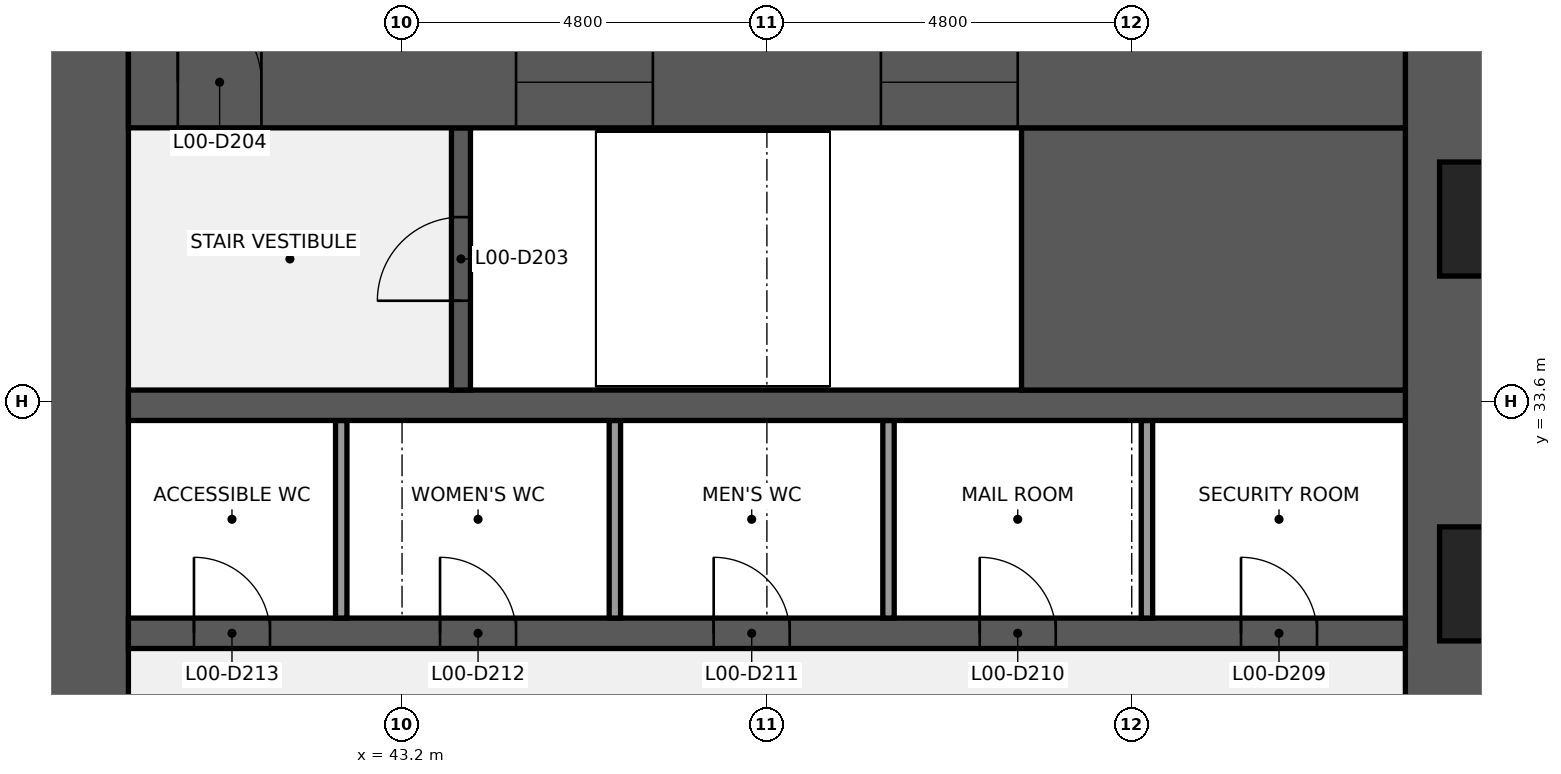
"""IFC4 building model, lengths in metres.
Left out: names, types, materials, properties, quantities, classifications, styles, units other than length and angle.
Written with IfcOpenShell. Run it as: python <this file> out.ifc"""

import sys

from ifc_helpers import new_model, si_unit, direction, frame, frame_2d, origin, place, context, subcontext, project, spatial, rectangle, extrude, element, fill, save


model = new_model("IFC4")
c1 = context("Model", 3, precision=1e-05, world=origin(), true_north=direction((0.0, 1.0)))
c2 = subcontext(c1, "Body", "Model", "MODEL_VIEW")
j1 = project(units=[si_unit("LENGTHUNIT", "METRE"), si_unit("PLANEANGLEUNIT", "RADIAN")], contexts=[c1])
p1 = place(None, origin())
s1 = spatial("IfcSite", under=j1, at=p1, CompositionType="ELEMENT")
p2 = place(p1, origin())
s2 = spatial("IfcBuilding", under=s1, at=p2, CompositionType="ELEMENT")
p3 = place(p2, origin())
s3 = spatial("IfcBuildingStorey", under=s2, at=p3, CompositionType="ELEMENT", Elevation=0.0)
p4 = place(p3, frame((57.0, 38.4, -2.0), z_axis=(0.0, 0.0, 1.0), x_axis=(0.0, -1.0, 0.0)))
e1 = element("IfcWall", 1, at=p4, inside=s3, PredefinedType="SHEAR", context=c2, shape_type="SweptSolid", body=[
    extrude(rectangle(XDim=28.8, YDim=1.2, at=frame_2d((14.4, 0.0))), origin(), (0.0, 0.0, 1.0), 14.3),
])
p5 = place(p4, frame((18.45, 0.0, 2.9)))
e2 = element("IfcOpeningElement", 2, at=p5, cuts=e1, PredefinedType="OPENING", context=c2, shape_type="SweptSolid", body=[
    extrude(rectangle(XDim=1.5, YDim=1.5, at=frame_2d((0.75, 0.75))), frame((0.0, 0.61, 0.0), z_axis=(0.0, -1.0, 0.0), x_axis=(1.0, 0.0, 0.0)), (0.0, 0.0, 1.0), 1.22),
])
p6 = place(p4, frame((8.85, 0.0, 2.9)))
e3 = element("IfcOpeningElement", 3, at=p6, cuts=e1, PredefinedType="OPENING", context=c2, shape_type="SweptSolid", body=[
    extrude(rectangle(XDim=1.5, YDim=1.5, at=frame_2d((0.75, 0.75))), frame((0.0, 0.61, 0.0), z_axis=(0.0, -1.0, 0.0), x_axis=(1.0, 0.0, 0.0)), (0.0, 0.0, 1.0), 1.22),
])
p7 = place(p3, frame((39.0, 9.6, -2.0), z_axis=(0.0, 0.0, 1.0), x_axis=(0.0, 1.0, 0.0)))
e4 = element("IfcWall", 4, at=p7, inside=s3, PredefinedType="SHEAR", context=c2, shape_type="SweptSolid", body=[
    extrude(rectangle(XDim=28.8, YDim=1.2, at=frame_2d((14.4, 0.0))), origin(), (0.0, 0.0, 1.0), 14.3),
])
p8 = place(p7, frame((8.7, 0.0, 2.0)))
e5 = element("IfcOpeningElement", 5, at=p8, cuts=e4, PredefinedType="OPENING", context=c2, shape_type="SweptSolid", body=[
    extrude(rectangle(XDim=1.8, YDim=2.1, at=frame_2d((0.9, 1.05))), frame((0.0, 0.61, 0.0), z_axis=(0.0, -1.0, 0.0), x_axis=(1.0, 0.0, 0.0)), (0.0, 0.0, 1.0), 1.22),
])
p9 = place(p7, frame((18.3, 0.0, 2.0)))
e6 = element("IfcOpeningElement", 6, at=p9, cuts=e4, PredefinedType="OPENING", context=c2, shape_type="SweptSolid", body=[
    extrude(rectangle(XDim=1.8, YDim=2.1, at=frame_2d((0.9, 1.05))), frame((0.0, 0.61, 0.0), z_axis=(0.0, -1.0, 0.0), x_axis=(1.0, 0.0, 0.0)), (0.0, 0.0, 1.0), 1.22),
])
p10 = place(p3, frame((39.6, 30.55, -2.0), z_axis=(0.0, 0.0, 1.0), x_axis=(1.0, 0.0, 0.0)))
e7 = element("IfcWall", 7, at=p10, inside=s3, PredefinedType="SHEAR", context=c2, shape_type="SweptSolid", body=[
    extrude(rectangle(XDim=16.8, YDim=0.4, at=frame_2d((8.4, 0.0))), origin(), (0.0, 0.0, 1.0), 14.3),
])
p11 = place(p10, frame((14.637, 0.0, 2.0)))
e8 = element("IfcOpeningElement", 8, at=p11, cuts=e7, PredefinedType="OPENING", context=c2, shape_type="SweptSolid", body=[
    extrude(rectangle(XDim=1.0, YDim=2.1, at=frame_2d((0.5, 1.05))), frame((0.0, 0.21, 0.0), z_axis=(0.0, -1.0, 0.0), x_axis=(1.0, 0.0, 0.0)), (0.0, 0.0, 1.0), 0.42),
])
p12 = place(p10, frame((11.2, 0.0, 2.0)))
e9 = element("IfcOpeningElement", 9, at=p12, cuts=e7, PredefinedType="OPENING", context=c2, shape_type="SweptSolid", body=[
    extrude(rectangle(XDim=1.0, YDim=2.1, at=frame_2d((0.5, 1.05))), frame((0.0, 0.21, 0.0), z_axis=(0.0, -1.0, 0.0), x_axis=(1.0, 0.0, 0.0)), (0.0, 0.0, 1.0), 0.42),
])
p13 = place(p10, frame((7.7, 0.0, 2.0)))
e10 = element("IfcOpeningElement", 10, at=p13, cuts=e7, PredefinedType="OPENING", context=c2, shape_type="SweptSolid", body=[
    extrude(rectangle(XDim=1.0, YDim=2.1, at=frame_2d((0.5, 1.05))), frame((0.0, 0.21, 0.0), z_axis=(0.0, -1.0, 0.0), x_axis=(1.0, 0.0, 0.0)), (0.0, 0.0, 1.0), 0.42),
])
p14 = place(p10, frame((4.1, 0.0, 2.0)))
e11 = element("IfcOpeningElement", 11, at=p14, cuts=e7, PredefinedType="OPENING", context=c2, shape_type="SweptSolid", body=[
    extrude(rectangle(XDim=1.0, YDim=2.1, at=frame_2d((0.5, 1.05))), frame((0.0, 0.21, 0.0), z_axis=(0.0, -1.0, 0.0), x_axis=(1.0, 0.0, 0.0)), (0.0, 0.0, 1.0), 0.42),
])
p15 = place(p10, frame((0.863, 0.0, 2.0)))
e12 = element("IfcOpeningElement", 12, at=p15, cuts=e7, PredefinedType="OPENING", context=c2, shape_type="SweptSolid", body=[
    extrude(rectangle(XDim=1.0, YDim=2.1, at=frame_2d((0.5, 1.05))), frame((0.0, 0.21, 0.0), z_axis=(0.0, -1.0, 0.0), x_axis=(1.0, 0.0, 0.0)), (0.0, 0.0, 1.0), 0.42),
])
for number, where, z_axis, x_axis in (
    (13, (53.0, 30.75, 0.0), (0.0, 0.0, 1.0), (0.0, 1.0, 0.0)),
    (14, (49.6, 30.75, 0.0), (0.0, 0.0, 1.0), (0.0, 1.0, 0.0)),
    (15, (46.0, 30.75, 0.0), (0.0, 0.0, 1.0), (0.0, 1.0, 0.0)),
    (16, (42.4, 30.75, 0.0), (0.0, 0.0, 1.0), (0.0, 1.0, 0.0)),
):
    element("IfcWall", number, at=place(p3, frame(where, z_axis=z_axis, x_axis=x_axis)), inside=s3, PredefinedType="PARTITIONING", context=c2, shape_type="SweptSolid", body=[
        extrude(rectangle(XDim=2.6, YDim=0.15, at=frame_2d((1.3, 0.0))), origin(), (0.0, 0.0, 1.0), 12.3),
    ])
p16 = place(p3, frame((39.6, 33.55, -2.0), z_axis=(0.0, 0.0, 1.0), x_axis=(1.0, 0.0, 0.0)))
e17 = element("IfcWall", 17, at=p16, inside=s3, PredefinedType="SHEAR", context=c2, shape_type="SweptSolid", body=[
    extrude(rectangle(XDim=16.8, YDim=0.4, at=frame_2d((8.4, 0.0))), origin(), (0.0, 0.0, 1.0), 14.3),
])
p17 = place(p3, frame((51.35, 35.475, -2.0), z_axis=(0.0, 0.0, 1.0), x_axis=(1.0, 0.0, 0.0)))
e18 = element("IfcWall", 18, at=p17, inside=s3, PredefinedType="SHEAR", context=c2, shape_type="SweptSolid", body=[
    extrude(rectangle(XDim=5.05, YDim=3.45, at=frame_2d((2.525, 0.0))), origin(), (0.0, 0.0, 1.0), 14.3),
])
p18 = place(p3, frame((43.975, 33.75, -2.0), z_axis=(0.0, 0.0, 1.0), x_axis=(0.0, 1.0, 0.0)))
e19 = element("IfcWall", 19, at=p18, inside=s3, PredefinedType="SHEAR", context=c2, shape_type="SweptSolid", body=[
    extrude(rectangle(XDim=3.45, YDim=0.25, at=frame_2d((1.725, 0.0))), origin(), (0.0, 0.0, 1.0), 14.3),
])
p19 = place(p18, frame((1.175, 0.0, 2.0)))
e20 = element("IfcOpeningElement", 20, at=p19, cuts=e19, PredefinedType="OPENING", context=c2, shape_type="SweptSolid", body=[
    extrude(rectangle(XDim=1.1, YDim=2.1, at=frame_2d((0.55, 1.05))), frame((0.0, 0.135, 0.0), z_axis=(0.0, -1.0, 0.0), x_axis=(1.0, 0.0, 0.0)), (0.0, 0.0, 1.0), 0.27),
])
p20 = place(p3, frame((39.6, 37.8, -2.0), z_axis=(0.0, 0.0, 1.0), x_axis=(1.0, 0.0, 0.0)))
e21 = element("IfcWall", 21, at=p20, inside=s3, PredefinedType="SHEAR", context=c2, shape_type="SweptSolid", body=[
    extrude(rectangle(XDim=16.8, YDim=1.2, at=frame_2d((8.4, 0.0))), origin(), (0.0, 0.0, 1.0), 14.3),
])
p21 = place(p20, frame((0.65, 0.0, 2.0)))
e22 = element("IfcOpeningElement", 22, at=p21, cuts=e21, PredefinedType="OPENING", context=c2, shape_type="SweptSolid", body=[
    extrude(rectangle(XDim=1.1, YDim=2.1, at=frame_2d((0.55, 1.05))), frame((0.0, 0.61, 0.0), z_axis=(0.0, -1.0, 0.0), x_axis=(1.0, 0.0, 0.0)), (0.0, 0.0, 1.0), 1.22),
])
p22 = place(p20, frame((9.9, 0.0, 2.9)))
e23 = element("IfcOpeningElement", 23, at=p22, cuts=e21, PredefinedType="OPENING", context=c2, shape_type="SweptSolid", body=[
    extrude(rectangle(XDim=1.8, YDim=1.5, at=frame_2d((0.9, 0.75))), frame((0.0, 0.61, 0.0), z_axis=(0.0, -1.0, 0.0), x_axis=(1.0, 0.0, 0.0)), (0.0, 0.0, 1.0), 1.22),
])
p23 = place(p20, frame((5.1, 0.0, 2.9)))
e24 = element("IfcOpeningElement", 24, at=p23, cuts=e21, PredefinedType="OPENING", context=c2, shape_type="SweptSolid", body=[
    extrude(rectangle(XDim=1.8, YDim=1.5, at=frame_2d((0.9, 0.75))), frame((0.0, 0.61, 0.0), z_axis=(0.0, -1.0, 0.0), x_axis=(1.0, 0.0, 0.0)), (0.0, 0.0, 1.0), 1.22),
])
p24 = place(p19, origin())
e25 = element("IfcDoor", 25, at=p24, inside=s3, OperationType="SINGLE_SWING_LEFT", PredefinedType="DOOR", context=c2, shape_type="SweptSolid", body=[
    extrude(rectangle(XDim=1.1, YDim=2.1, at=frame_2d((0.55, 1.05))), frame((0.0, 0.025, 0.0), z_axis=(0.0, -1.0, 0.0), x_axis=(1.0, 0.0, 0.0)), (0.0, 0.0, 1.0), 0.05),
])
fill(e20, e25)
p25 = place(p21, origin())
e26 = element("IfcDoor", 26, at=p25, inside=s3, OperationType="SINGLE_SWING_LEFT", PredefinedType="DOOR", context=c2, shape_type="SweptSolid", body=[
    extrude(rectangle(XDim=1.1, YDim=2.1, at=frame_2d((0.55, 1.05))), frame((0.0, 0.025, 0.0), z_axis=(0.0, -1.0, 0.0), x_axis=(1.0, 0.0, 0.0)), (0.0, 0.0, 1.0), 0.05),
])
fill(e22, e26)
p26 = place(p11, origin())
e27 = element("IfcDoor", 27, at=p26, inside=s3, OperationType="SINGLE_SWING_LEFT", PredefinedType="DOOR", context=c2, shape_type="SweptSolid", body=[
    extrude(rectangle(XDim=1.0, YDim=2.1, at=frame_2d((0.5, 1.05))), frame((0.0, 0.025, 0.0), z_axis=(0.0, -1.0, 0.0), x_axis=(1.0, 0.0, 0.0)), (0.0, 0.0, 1.0), 0.05),
])
fill(e8, e27)
p27 = place(p12, origin())
e28 = element("IfcDoor", 28, at=p27, inside=s3, OperationType="SINGLE_SWING_LEFT", PredefinedType="DOOR", context=c2, shape_type="SweptSolid", body=[
    extrude(rectangle(XDim=1.0, YDim=2.1, at=frame_2d((0.5, 1.05))), frame((0.0, 0.025, 0.0), z_axis=(0.0, -1.0, 0.0), x_axis=(1.0, 0.0, 0.0)), (0.0, 0.0, 1.0), 0.05),
])
fill(e9, e28)
p28 = place(p13, origin())
e29 = element("IfcDoor", 29, at=p28, inside=s3, OperationType="SINGLE_SWING_LEFT", PredefinedType="DOOR", context=c2, shape_type="SweptSolid", body=[
    extrude(rectangle(XDim=1.0, YDim=2.1, at=frame_2d((0.5, 1.05))), frame((0.0, 0.025, 0.0), z_axis=(0.0, -1.0, 0.0), x_axis=(1.0, 0.0, 0.0)), (0.0, 0.0, 1.0), 0.05),
])
fill(e10, e29)
p29 = place(p14, origin())
e30 = element("IfcDoor", 30, at=p29, inside=s3, OperationType="SINGLE_SWING_LEFT", PredefinedType="DOOR", context=c2, shape_type="SweptSolid", body=[
    extrude(rectangle(XDim=1.0, YDim=2.1, at=frame_2d((0.5, 1.05))), frame((0.0, 0.025, 0.0), z_axis=(0.0, -1.0, 0.0), x_axis=(1.0, 0.0, 0.0)), (0.0, 0.0, 1.0), 0.05),
])
fill(e11, e30)
p30 = place(p15, origin())
e31 = element("IfcDoor", 31, at=p30, inside=s3, OperationType="SINGLE_SWING_LEFT", PredefinedType="DOOR", context=c2, shape_type="SweptSolid", body=[
    extrude(rectangle(XDim=1.0, YDim=2.1, at=frame_2d((0.5, 1.05))), frame((0.0, 0.025, 0.0), z_axis=(0.0, -1.0, 0.0), x_axis=(1.0, 0.0, 0.0)), (0.0, 0.0, 1.0), 0.05),
])
fill(e12, e31)
p31 = place(p22, origin())
e32 = element("IfcWindow", 32, at=p31, inside=s3, PartitioningType="SINGLE_PANEL", PredefinedType="WINDOW", context=c2, shape_type="SweptSolid", body=[
    extrude(rectangle(XDim=1.8, YDim=1.5, at=frame_2d((0.9, 0.75))), frame((0.0, 0.03, 0.0), z_axis=(0.0, -1.0, 0.0), x_axis=(1.0, 0.0, 0.0)), (0.0, 0.0, 1.0), 0.06),
])
fill(e23, e32)
p32 = place(p23, origin())
e33 = element("IfcWindow", 33, at=p32, inside=s3, PartitioningType="SINGLE_PANEL", PredefinedType="WINDOW", context=c2, shape_type="SweptSolid", body=[
    extrude(rectangle(XDim=1.8, YDim=1.5, at=frame_2d((0.9, 0.75))), frame((0.0, 0.03, 0.0), z_axis=(0.0, -1.0, 0.0), x_axis=(1.0, 0.0, 0.0)), (0.0, 0.0, 1.0), 0.06),
])
fill(e24, e33)
save(model, sys.argv[1])
